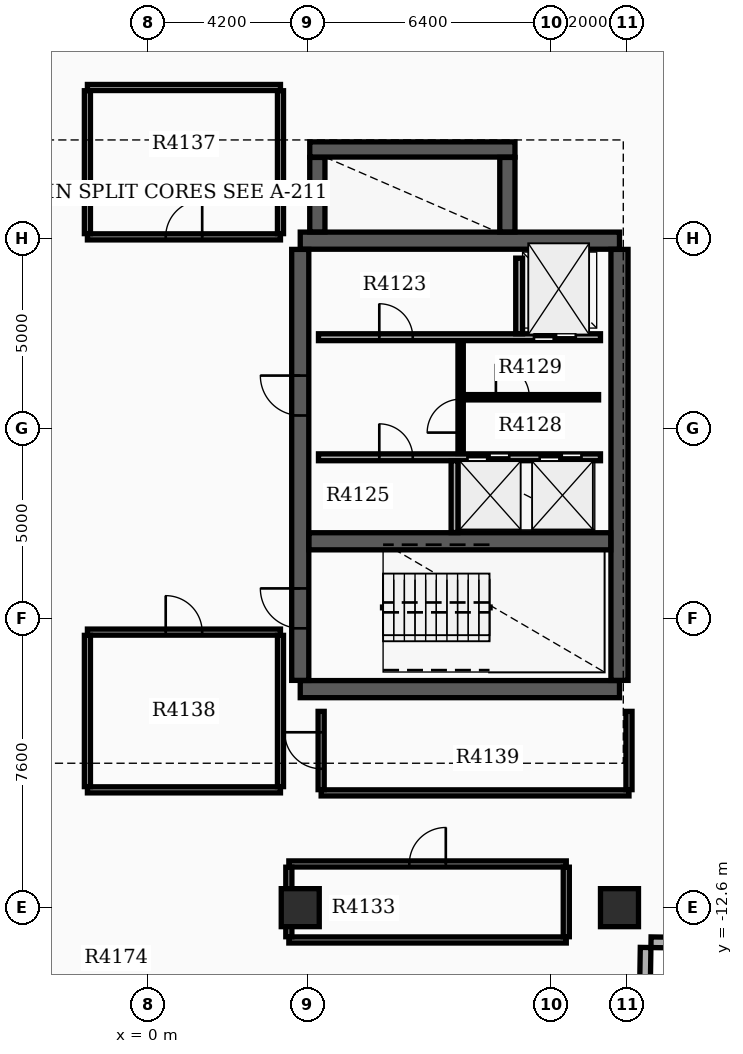
"""IFC4 building model, lengths in metres.
Left out: names, types, materials, properties, quantities, classifications, styles, units other than length and angle.
Written with IfcOpenShell. Run it as: python <this file> out.ifc"""

import sys

from ifc_helpers import new_model, si_unit, direction, frame, frame_2d, origin, origin_2d, place, context, subcontext, project, spatial, rectangle, extrude, element, fill, save


model = new_model("IFC4")
c1 = context("Model", 3, precision=1e-05, world=origin(), true_north=direction((0.0, 1.0)))
c2 = subcontext(c1, "Body", "Model", "MODEL_VIEW")
j1 = project(units=[si_unit("LENGTHUNIT", "METRE"), si_unit("PLANEANGLEUNIT", "RADIAN")], contexts=[c1])
p1 = place(None, origin())
s1 = spatial("IfcSite", under=j1, at=p1, CompositionType="ELEMENT")
p2 = place(p1, origin())
s2 = spatial("IfcBuilding", under=s1, at=p2, CompositionType="ELEMENT")
p3 = place(p2, frame((0.0, 0.0, 261.6)))
s3 = spatial("IfcBuildingStorey", under=s2, at=p3, CompositionType="ELEMENT", Elevation=261.6)
for number, where, z_axis, x_axis in (
    (1, (4.0, -6.85, 0.0), (0.0, 0.0, 1.0), (1.0, 0.0, 0.0)),
    (2, (4.0, 4.95, 0.0), (0.0, 0.0, 1.0), (1.0, 0.0, 0.0)),
):
    element("IfcWall", number, at=place(p3, frame(where, z_axis=z_axis, x_axis=x_axis)), inside=s3, PredefinedType="SHEAR", context=c2, shape_type="SweptSolid", body=[
        extrude(rectangle(XDim=8.4, YDim=0.45, at=frame_2d((4.2, 0.0))), origin(), (0.0, 0.0, 1.0), 3.7),
    ])
p4 = place(p3, frame((4.0, -6.62, 0.0), z_axis=(0.0, 0.0, 1.0), x_axis=(0.0, 1.0, 0.0)))
e3 = element("IfcWall", 3, at=p4, inside=s3, PredefinedType="SHEAR", context=c2, shape_type="SweptSolid", body=[
    extrude(rectangle(XDim=11.34, YDim=0.45, at=frame_2d((5.67, 0.0))), origin(), (0.0, 0.0, 1.0), 3.7),
])
p5 = place(p4, frame((1.37, 0.0, 0.0)))
e4 = element("IfcOpeningElement", 4, at=p5, cuts=e3, PredefinedType="OPENING", context=c2, shape_type="SweptSolid", body=[
    extrude(rectangle(XDim=1.05, YDim=2.15, at=frame_2d((0.525, 1.075))), frame((0.0, 0.235, 0.0), z_axis=(0.0, -1.0, 0.0), x_axis=(1.0, 0.0, 0.0)), (0.0, 0.0, 1.0), 0.47),
])
p6 = place(p4, frame((6.97, 0.0, 0.0)))
e5 = element("IfcOpeningElement", 5, at=p6, cuts=e3, PredefinedType="OPENING", context=c2, shape_type="SweptSolid", body=[
    extrude(rectangle(XDim=1.05, YDim=2.15, at=frame_2d((0.525, 1.075))), frame((0.0, 0.235, 0.0), z_axis=(0.0, -1.0, 0.0), x_axis=(1.0, 0.0, 0.0)), (0.0, 0.0, 1.0), 0.47),
])
p7 = place(p3, frame((12.4, -6.62, 0.0), z_axis=(0.0, 0.0, 1.0), x_axis=(0.0, 1.0, 0.0)))
e6 = element("IfcWall", 6, at=p7, inside=s3, PredefinedType="SHEAR", context=c2, shape_type="SweptSolid", body=[
    extrude(rectangle(XDim=11.34, YDim=0.45, at=frame_2d((5.67, 0.0))), origin(), (0.0, 0.0, 1.0), 3.7),
])
p8 = place(p3, frame((4.23, -2.96, 0.0), z_axis=(0.0, 0.0, 1.0), x_axis=(1.0, 0.0, 0.0)))
e7 = element("IfcWall", 7, at=p8, inside=s3, PredefinedType="SHEAR", context=c2, shape_type="SweptSolid", body=[
    extrude(rectangle(XDim=7.94, YDim=0.45, at=frame_2d((3.97, 0.0))), origin(), (0.0, 0.0, 1.0), 3.7),
])
p9 = place(p3, frame((4.45, 5.18, 0.0), z_axis=(0.0, 0.0, 1.0), x_axis=(0.0, 1.0, 0.0)))
e8 = element("IfcWall", 8, at=p9, inside=s3, PredefinedType="SHEAR", context=c2, shape_type="SweptSolid", body=[
    extrude(rectangle(XDim=1.96, YDim=0.4, at=frame_2d((0.98, 0.0))), origin(), (0.0, 0.0, 1.0), 3.7),
])
p10 = place(p3, frame((4.25, 7.35, 0.0), z_axis=(0.0, 0.0, 1.0), x_axis=(1.0, 0.0, 0.0)))
e9 = element("IfcWall", 9, at=p10, inside=s3, PredefinedType="SHEAR", context=c2, shape_type="SweptSolid", body=[
    extrude(rectangle(XDim=5.4, YDim=0.4, at=frame_2d((2.7, 0.0))), origin(), (0.0, 0.0, 1.0), 3.7),
])
p11 = place(p3, frame((9.45, 5.18, 0.0), z_axis=(0.0, 0.0, 1.0), x_axis=(0.0, 1.0, 0.0)))
e10 = element("IfcWall", 10, at=p11, inside=s3, PredefinedType="SHEAR", context=c2, shape_type="SweptSolid", body=[
    extrude(rectangle(XDim=1.96, YDim=0.4, at=frame_2d((0.98, 0.0))), origin(), (0.0, 0.0, 1.0), 3.7),
])
for number, where, z_axis, x_axis in (
    (11, (12.4, -12.6, 0.0), (0.0, 0.0, 1.0), (1.0, 0.0, 0.0)),
    (12, (4.0, -12.6, 0.0), (0.0, 0.0, 1.0), (1.0, 0.0, 0.0)),
):
    element("IfcColumn", number, at=place(p3, frame(where, z_axis=z_axis, x_axis=x_axis)), inside=s3, PredefinedType="COLUMN", context=c2, shape_type="SweptSolid", body=[
        extrude(rectangle(XDim=1.0, YDim=1.0, at=origin_2d()), origin(), (0.0, 0.0, 1.0), 3.9),
    ])
p12 = place(p3, frame((14.449, -13.529, 0.0), z_axis=(0.0, 0.0, 1.0), x_axis=(-0.999878147354, 0.015610587569, 0.0)))
e13 = element("IfcWall", 13, at=p12, inside=s3, PredefinedType="STANDARD", context=c2, shape_type="SweptSolid", body=[
    extrude(rectangle(XDim=1.22, YDim=0.28, at=frame_2d((0.61, 0.0))), origin(), (0.0, 0.0, 1.0), 3.18),
])
p13 = place(p3, frame((13.087, -13.647, 0.0), z_axis=(0.0, 0.0, 1.0), x_axis=(-0.015785793208, -0.999875396603, 0.0)))
e14 = element("IfcWall", 14, at=p13, inside=s3, PredefinedType="STANDARD", context=c2, shape_type="SweptSolid", body=[
    extrude(rectangle(XDim=1.5, YDim=0.28, at=frame_2d((0.75, 0.0))), origin(), (0.0, 0.0, 1.0), 3.18),
])
p14 = place(p3, frame((4.48, 2.41, 0.0), z_axis=(0.0, 0.0, 1.0), x_axis=(1.0, 0.0, 0.0)))
e15 = element("IfcWall", 15, at=p14, inside=s3, PredefinedType="SOLIDWALL", context=c2, shape_type="SweptSolid", body=[
    extrude(rectangle(XDim=7.42, YDim=0.18, at=frame_2d((3.71, 0.0))), origin(), (0.0, 0.0, 1.0), 3.17),
])
p15 = place(p14, frame((5.67, 0.0, 0.0)))
e16 = element("IfcOpeningElement", 16, at=p15, cuts=e15, PredefinedType="OPENING", context=c2, shape_type="SweptSolid", body=[
    extrude(rectangle(XDim=1.1, YDim=2.15, at=frame_2d((0.55, 1.075))), frame((0.0, 0.1, 0.0), z_axis=(0.0, -1.0, 0.0), x_axis=(1.0, 0.0, 0.0)), (0.0, 0.0, 1.0), 0.2),
])
p16 = place(p14, frame((1.6, 0.0, 0.0)))
e17 = element("IfcOpeningElement", 17, at=p16, cuts=e15, PredefinedType="OPENING", context=c2, shape_type="SweptSolid", body=[
    extrude(rectangle(XDim=0.88, YDim=2.1, at=frame_2d((0.44, 1.05))), frame((0.0, 0.1, 0.0), z_axis=(0.0, -1.0, 0.0), x_axis=(1.0, 0.0, 0.0)), (0.0, 0.0, 1.0), 0.2),
])
p17 = place(p3, frame((4.48, -0.75, 0.0), z_axis=(0.0, 0.0, 1.0), x_axis=(1.0, 0.0, 0.0)))
e18 = element("IfcWall", 18, at=p17, inside=s3, PredefinedType="SOLIDWALL", context=c2, shape_type="SweptSolid", body=[
    extrude(rectangle(XDim=7.42, YDim=0.18, at=frame_2d((3.71, 0.0))), origin(), (0.0, 0.0, 1.0), 3.17),
])
p18 = place(p17, frame((3.92, 0.0, 0.0)))
e19 = element("IfcOpeningElement", 19, at=p18, cuts=e18, PredefinedType="OPENING", context=c2, shape_type="SweptSolid", body=[
    extrude(rectangle(XDim=1.1, YDim=2.15, at=frame_2d((0.55, 1.075))), frame((0.0, 0.1, 0.0), z_axis=(0.0, -1.0, 0.0), x_axis=(1.0, 0.0, 0.0)), (0.0, 0.0, 1.0), 0.2),
])
p19 = place(p17, frame((5.82, 0.0, 0.0)))
e20 = element("IfcOpeningElement", 20, at=p19, cuts=e18, PredefinedType="OPENING", context=c2, shape_type="SweptSolid", body=[
    extrude(rectangle(XDim=1.1, YDim=2.15, at=frame_2d((0.55, 1.075))), frame((0.0, 0.1, 0.0), z_axis=(0.0, -1.0, 0.0), x_axis=(1.0, 0.0, 0.0)), (0.0, 0.0, 1.0), 0.2),
])
p20 = place(p17, frame((1.6, 0.0, 0.0)))
e21 = element("IfcOpeningElement", 21, at=p20, cuts=e18, PredefinedType="OPENING", context=c2, shape_type="SweptSolid", body=[
    extrude(rectangle(XDim=0.88, YDim=2.1, at=frame_2d((0.44, 1.05))), frame((0.0, 0.1, 0.0), z_axis=(0.0, -1.0, 0.0), x_axis=(1.0, 0.0, 0.0)), (0.0, 0.0, 1.0), 0.2),
])
p21 = place(p3, frame((9.76, 2.5, 0.0), z_axis=(0.0, 0.0, 1.0), x_axis=(0.0, 1.0, 0.0)))
e22 = element("IfcWall", 22, at=p21, inside=s3, PredefinedType="SOLIDWALL", context=c2, shape_type="SweptSolid", body=[
    extrude(rectangle(XDim=1.99, YDim=0.18, at=frame_2d((0.995, 0.0))), origin(), (0.0, 0.0, 1.0), 3.17),
])
p22 = place(p3, frame((8.06, -2.73, 0.0), z_axis=(0.0, 0.0, 1.0), x_axis=(0.0, 1.0, 0.0)))
e23 = element("IfcWall", 23, at=p22, inside=s3, PredefinedType="SOLIDWALL", context=c2, shape_type="SweptSolid", body=[
    extrude(rectangle(XDim=1.89, YDim=0.18, at=frame_2d((0.945, 0.0))), origin(), (0.0, 0.0, 1.0), 3.17),
])
p23 = place(p3, frame((8.22, -0.65, 0.0), z_axis=(0.0, 0.0, 1.0), x_axis=(0.0, 1.0, 0.0)))
e24 = element("IfcWall", 24, at=p23, inside=s3, PredefinedType="SOLIDWALL", context=c2, shape_type="SweptSolid", body=[
    extrude(rectangle(XDim=2.96, YDim=0.14, at=frame_2d((1.48, 0.0))), origin(), (0.0, 0.0, 1.0), 3.17),
])
p24 = place(p23, frame((0.55, 0.0, 0.0)))
e25 = element("IfcOpeningElement", 25, at=p24, cuts=e24, PredefinedType="OPENING", context=c2, shape_type="SweptSolid", body=[
    extrude(rectangle(XDim=0.88, YDim=2.1, at=frame_2d((0.44, 1.05))), frame((0.0, 0.08, 0.0), z_axis=(0.0, -1.0, 0.0), x_axis=(1.0, 0.0, 0.0)), (0.0, 0.0, 1.0), 0.16),
])
p25 = place(p3, frame((8.298, 0.83, 0.0), z_axis=(0.0, 0.0, 1.0), x_axis=(1.0, 0.0, 0.0)))
e26 = element("IfcWall", 26, at=p25, inside=s3, PredefinedType="PARTITIONING", context=c2, shape_type="SweptSolid", body=[
    extrude(rectangle(XDim=3.552, YDim=0.14, at=frame_2d((1.776, 0.0))), origin(), (0.0, 0.0, 1.0), 3.17),
])
p26 = place(p25, frame((0.85, 0.0, 0.0)))
e27 = element("IfcOpeningElement", 27, at=p26, cuts=e26, PredefinedType="OPENING", context=c2, shape_type="SweptSolid", body=[
    extrude(rectangle(XDim=0.88, YDim=2.1, at=frame_2d((0.44, 1.05))), frame((0.0, 0.08, 0.0), z_axis=(0.0, -1.0, 0.0), x_axis=(1.0, 0.0, 0.0)), (0.0, 0.0, 1.0), 0.16),
])
p27 = place(p3, frame((3.7, -13.45, 0.0), z_axis=(0.0, 0.0, 1.0), x_axis=(1.0, 0.0, 0.0)))
e28 = element("IfcWall", 28, at=p27, inside=s3, PredefinedType="PARTITIONING", context=c2, shape_type="SweptSolid", body=[
    extrude(rectangle(XDim=7.3, YDim=0.16, at=frame_2d((3.65, 0.0))), origin(), (0.0, 0.0, 1.0), 3.17),
])
p28 = place(p3, frame((3.7, -11.45, 0.0), z_axis=(0.0, 0.0, 1.0), x_axis=(1.0, 0.0, 0.0)))
e29 = element("IfcWall", 29, at=p28, inside=s3, PredefinedType="PARTITIONING", context=c2, shape_type="SweptSolid", body=[
    extrude(rectangle(XDim=7.3, YDim=0.16, at=frame_2d((3.65, 0.0))), origin(), (0.0, 0.0, 1.0), 3.17),
])
p29 = place(p28, frame((3.17, 0.0, 0.0)))
e30 = element("IfcOpeningElement", 30, at=p29, cuts=e29, PredefinedType="OPENING", context=c2, shape_type="SweptSolid", body=[
    extrude(rectangle(XDim=0.96, YDim=2.15, at=frame_2d((0.48, 1.075))), frame((0.0, 0.09, 0.0), z_axis=(0.0, -1.0, 0.0), x_axis=(1.0, 0.0, 0.0)), (0.0, 0.0, 1.0), 0.18),
])
for number, where, z_axis, x_axis in (
    (31, (3.7, -13.365, 0.0), (0.0, 0.0, 1.0), (0.0, 1.0, 0.0)),
    (32, (11.0, -13.365, 0.0), (0.0, 0.0, 1.0), (0.0, 1.0, 0.0)),
):
    element("IfcWall", number, at=place(p3, frame(where, z_axis=z_axis, x_axis=x_axis)), inside=s3, PredefinedType="PARTITIONING", context=c2, shape_type="SweptSolid", body=[
        extrude(rectangle(XDim=1.83, YDim=0.16, at=frame_2d((0.915, 0.0))), origin(), (0.0, 0.0, 1.0), 3.17),
    ])
p30 = place(p3, frame((-1.6, 5.05, 0.0), z_axis=(0.0, 0.0, 1.0), x_axis=(1.0, 0.0, 0.0)))
e33 = element("IfcWall", 33, at=p30, inside=s3, PredefinedType="PARTITIONING", context=c2, shape_type="SweptSolid", body=[
    extrude(rectangle(XDim=5.08, YDim=0.16, at=frame_2d((2.54, 0.0))), origin(), (0.0, 0.0, 1.0), 3.17),
])
p31 = place(p30, frame((2.06, 0.0, 0.0)))
e34 = element("IfcOpeningElement", 34, at=p31, cuts=e33, PredefinedType="OPENING", context=c2, shape_type="SweptSolid", body=[
    extrude(rectangle(XDim=0.96, YDim=2.15, at=frame_2d((0.48, 1.075))), frame((0.0, 0.09, 0.0), z_axis=(0.0, -1.0, 0.0), x_axis=(1.0, 0.0, 0.0)), (0.0, 0.0, 1.0), 0.18),
])
p32 = place(p3, frame((-1.6, 8.98, 0.0), z_axis=(0.0, 0.0, 1.0), x_axis=(1.0, 0.0, 0.0)))
e35 = element("IfcWall", 35, at=p32, inside=s3, PredefinedType="PARTITIONING", context=c2, shape_type="SweptSolid", body=[
    extrude(rectangle(XDim=5.08, YDim=0.16, at=frame_2d((2.54, 0.0))), origin(), (0.0, 0.0, 1.0), 3.17),
])
for number, where, z_axis, x_axis in (
    (36, (-1.6, 5.135, 0.0), (0.0, 0.0, 1.0), (0.0, 1.0, 0.0)),
    (37, (3.48, 5.135, 0.0), (0.0, 0.0, 1.0), (0.0, 1.0, 0.0)),
):
    element("IfcWall", number, at=place(p3, frame(where, z_axis=z_axis, x_axis=x_axis)), inside=s3, PredefinedType="PARTITIONING", context=c2, shape_type="SweptSolid", body=[
        extrude(rectangle(XDim=3.76, YDim=0.16, at=frame_2d((1.88, 0.0))), origin(), (0.0, 0.0, 1.0), 3.17),
    ])
p33 = place(p3, frame((-1.6, -9.5, 0.0), z_axis=(0.0, 0.0, 1.0), x_axis=(1.0, 0.0, 0.0)))
e38 = element("IfcWall", 38, at=p33, inside=s3, PredefinedType="PARTITIONING", context=c2, shape_type="SweptSolid", body=[
    extrude(rectangle(XDim=5.08, YDim=0.16, at=frame_2d((2.54, 0.0))), origin(), (0.0, 0.0, 1.0), 3.17),
])
p34 = place(p3, frame((-1.6, -5.35, 0.0), z_axis=(0.0, 0.0, 1.0), x_axis=(1.0, 0.0, 0.0)))
e39 = element("IfcWall", 39, at=p34, inside=s3, PredefinedType="PARTITIONING", context=c2, shape_type="SweptSolid", body=[
    extrude(rectangle(XDim=5.08, YDim=0.16, at=frame_2d((2.54, 0.0))), origin(), (0.0, 0.0, 1.0), 3.17),
])
p35 = place(p34, frame((2.06, 0.0, 0.0)))
e40 = element("IfcOpeningElement", 40, at=p35, cuts=e39, PredefinedType="OPENING", context=c2, shape_type="SweptSolid", body=[
    extrude(rectangle(XDim=0.96, YDim=2.15, at=frame_2d((0.48, 1.075))), frame((0.0, 0.09, 0.0), z_axis=(0.0, -1.0, 0.0), x_axis=(1.0, 0.0, 0.0)), (0.0, 0.0, 1.0), 0.18),
])
for number, where, z_axis, x_axis in (
    (41, (-1.6, -9.415, 0.0), (0.0, 0.0, 1.0), (0.0, 1.0, 0.0)),
    (42, (3.48, -9.415, 0.0), (0.0, 0.0, 1.0), (0.0, 1.0, 0.0)),
):
    element("IfcWall", number, at=place(p3, frame(where, z_axis=z_axis, x_axis=x_axis)), inside=s3, PredefinedType="PARTITIONING", context=c2, shape_type="SweptSolid", body=[
        extrude(rectangle(XDim=3.98, YDim=0.16, at=frame_2d((1.99, 0.0))), origin(), (0.0, 0.0, 1.0), 3.17),
    ])
p36 = place(p3, frame((4.55, -9.58, 0.0), z_axis=(0.0, 0.0, 1.0), x_axis=(1.0, 0.0, 0.0)))
e43 = element("IfcWall", 43, at=p36, inside=s3, PredefinedType="PARTITIONING", context=c2, shape_type="SweptSolid", body=[
    extrude(rectangle(XDim=8.1, YDim=0.16, at=frame_2d((4.05, 0.0))), origin(), (0.0, 0.0, 1.0), 3.17),
])
p37 = place(p3, frame((4.55, -9.495, 0.0), z_axis=(0.0, 0.0, 1.0), x_axis=(0.0, 1.0, 0.0)))
e44 = element("IfcWall", 44, at=p37, inside=s3, PredefinedType="PARTITIONING", context=c2, shape_type="SweptSolid", body=[
    extrude(rectangle(XDim=2.06, YDim=0.16, at=frame_2d((1.03, 0.0))), origin(), (0.0, 0.0, 1.0), 3.17),
])
p38 = place(p37, frame((0.55, 0.0, 0.0)))
e45 = element("IfcOpeningElement", 45, at=p38, cuts=e44, PredefinedType="OPENING", context=c2, shape_type="SweptSolid", body=[
    extrude(rectangle(XDim=0.96, YDim=2.15, at=frame_2d((0.48, 1.075))), frame((0.0, 0.09, 0.0), z_axis=(0.0, -1.0, 0.0), x_axis=(1.0, 0.0, 0.0)), (0.0, 0.0, 1.0), 0.18),
])
p39 = place(p3, frame((12.65, -9.495, 0.0), z_axis=(0.0, 0.0, 1.0), x_axis=(0.0, 1.0, 0.0)))
e46 = element("IfcWall", 46, at=p39, inside=s3, PredefinedType="PARTITIONING", context=c2, shape_type="SweptSolid", body=[
    extrude(rectangle(XDim=2.06, YDim=0.16, at=frame_2d((1.03, 0.0))), origin(), (0.0, 0.0, 1.0), 3.17),
])
p40 = place(p5, origin())
e47 = element("IfcDoor", 47, at=p40, inside=s3, OperationType="SINGLE_SWING_RIGHT", PredefinedType="DOOR", context=c2, shape_type="SweptSolid", body=[
    extrude(rectangle(XDim=1.05, YDim=2.15, at=frame_2d((0.525, 1.075))), frame((0.0, 0.025, 0.0), z_axis=(0.0, -1.0, 0.0), x_axis=(1.0, 0.0, 0.0)), (0.0, 0.0, 1.0), 0.05),
])
fill(e4, e47)
p41 = place(p6, origin())
e48 = element("IfcDoor", 48, at=p41, inside=s3, OperationType="SINGLE_SWING_RIGHT", PredefinedType="DOOR", context=c2, shape_type="SweptSolid", body=[
    extrude(rectangle(XDim=1.05, YDim=2.15, at=frame_2d((0.525, 1.075))), frame((0.0, 0.025, 0.0), z_axis=(0.0, -1.0, 0.0), x_axis=(1.0, 0.0, 0.0)), (0.0, 0.0, 1.0), 0.05),
])
fill(e5, e48)
p42 = place(p15, origin())
e49 = element("IfcDoor", 49, at=p42, inside=s3, OperationType="DOUBLE_DOOR_SLIDING", PredefinedType="DOOR", context=c2, shape_type="SweptSolid", body=[
    extrude(rectangle(XDim=1.1, YDim=2.15, at=frame_2d((0.55, 1.075))), frame((0.0, 0.025, 0.0), z_axis=(0.0, -1.0, 0.0), x_axis=(1.0, 0.0, 0.0)), (0.0, 0.0, 1.0), 0.05),
])
fill(e16, e49)
p43 = place(p18, origin())
e50 = element("IfcDoor", 50, at=p43, inside=s3, OperationType="DOUBLE_DOOR_SLIDING", PredefinedType="DOOR", context=c2, shape_type="SweptSolid", body=[
    extrude(rectangle(XDim=1.1, YDim=2.15, at=frame_2d((0.55, 1.075))), frame((0.0, 0.025, 0.0), z_axis=(0.0, -1.0, 0.0), x_axis=(1.0, 0.0, 0.0)), (0.0, 0.0, 1.0), 0.05),
])
fill(e19, e50)
p44 = place(p19, origin())
e51 = element("IfcDoor", 51, at=p44, inside=s3, OperationType="DOUBLE_DOOR_SLIDING", PredefinedType="DOOR", context=c2, shape_type="SweptSolid", body=[
    extrude(rectangle(XDim=1.1, YDim=2.15, at=frame_2d((0.55, 1.075))), frame((0.0, 0.025, 0.0), z_axis=(0.0, -1.0, 0.0), x_axis=(1.0, 0.0, 0.0)), (0.0, 0.0, 1.0), 0.05),
])
fill(e20, e51)
p45 = place(p16, origin())
e52 = element("IfcDoor", 52, at=p45, inside=s3, OperationType="SINGLE_SWING_LEFT", PredefinedType="DOOR", context=c2, shape_type="SweptSolid", body=[
    extrude(rectangle(XDim=0.88, YDim=2.1, at=frame_2d((0.44, 1.05))), frame((0.0, 0.025, 0.0), z_axis=(0.0, -1.0, 0.0), x_axis=(1.0, 0.0, 0.0)), (0.0, 0.0, 1.0), 0.05),
])
fill(e17, e52)
p46 = place(p20, origin())
e53 = element("IfcDoor", 53, at=p46, inside=s3, OperationType="SINGLE_SWING_LEFT", PredefinedType="DOOR", context=c2, shape_type="SweptSolid", body=[
    extrude(rectangle(XDim=0.88, YDim=2.1, at=frame_2d((0.44, 1.05))), frame((0.0, 0.025, 0.0), z_axis=(0.0, -1.0, 0.0), x_axis=(1.0, 0.0, 0.0)), (0.0, 0.0, 1.0), 0.05),
])
fill(e21, e53)
p47 = place(p24, origin())
e54 = element("IfcDoor", 54, at=p47, inside=s3, OperationType="SINGLE_SWING_LEFT", PredefinedType="DOOR", context=c2, shape_type="SweptSolid", body=[
    extrude(rectangle(XDim=0.88, YDim=2.1, at=frame_2d((0.44, 1.05))), frame((0.0, 0.025, 0.0), z_axis=(0.0, -1.0, 0.0), x_axis=(1.0, 0.0, 0.0)), (0.0, 0.0, 1.0), 0.05),
])
fill(e25, e54)
p48 = place(p26, origin())
e55 = element("IfcDoor", 55, at=p48, inside=s3, OperationType="SINGLE_SWING_LEFT", PredefinedType="DOOR", context=c2, shape_type="SweptSolid", body=[
    extrude(rectangle(XDim=0.88, YDim=2.1, at=frame_2d((0.44, 1.05))), frame((0.0, 0.025, 0.0), z_axis=(0.0, -1.0, 0.0), x_axis=(1.0, 0.0, 0.0)), (0.0, 0.0, 1.0), 0.05),
])
fill(e27, e55)
p49 = place(p29, origin())
e56 = element("IfcDoor", 56, at=p49, inside=s3, OperationType="SINGLE_SWING_RIGHT", PredefinedType="DOOR", context=c2, shape_type="SweptSolid", body=[
    extrude(rectangle(XDim=0.96, YDim=2.15, at=frame_2d((0.48, 1.075))), frame((0.0, 0.025, 0.0), z_axis=(0.0, -1.0, 0.0), x_axis=(1.0, 0.0, 0.0)), (0.0, 0.0, 1.0), 0.05),
])
fill(e30, e56)
p50 = place(p31, origin())
e57 = element("IfcDoor", 57, at=p50, inside=s3, OperationType="SINGLE_SWING_RIGHT", PredefinedType="DOOR", context=c2, shape_type="SweptSolid", body=[
    extrude(rectangle(XDim=0.96, YDim=2.15, at=frame_2d((0.48, 1.075))), frame((0.0, 0.025, 0.0), z_axis=(0.0, -1.0, 0.0), x_axis=(1.0, 0.0, 0.0)), (0.0, 0.0, 1.0), 0.05),
])
fill(e34, e57)
p51 = place(p35, origin())
e58 = element("IfcDoor", 58, at=p51, inside=s3, OperationType="SINGLE_SWING_LEFT", PredefinedType="DOOR", context=c2, shape_type="SweptSolid", body=[
    extrude(rectangle(XDim=0.96, YDim=2.15, at=frame_2d((0.48, 1.075))), frame((0.0, 0.025, 0.0), z_axis=(0.0, -1.0, 0.0), x_axis=(1.0, 0.0, 0.0)), (0.0, 0.0, 1.0), 0.05),
])
fill(e40, e58)
p52 = place(p38, origin())
e59 = element("IfcDoor", 59, at=p52, inside=s3, OperationType="SINGLE_SWING_RIGHT", PredefinedType="DOOR", context=c2, shape_type="SweptSolid", body=[
    extrude(rectangle(XDim=0.96, YDim=2.15, at=frame_2d((0.48, 1.075))), frame((0.0, 0.025, 0.0), z_axis=(0.0, -1.0, 0.0), x_axis=(1.0, 0.0, 0.0)), (0.0, 0.0, 1.0), 0.05),
])
fill(e45, e59)
save(model, sys.argv[1])
